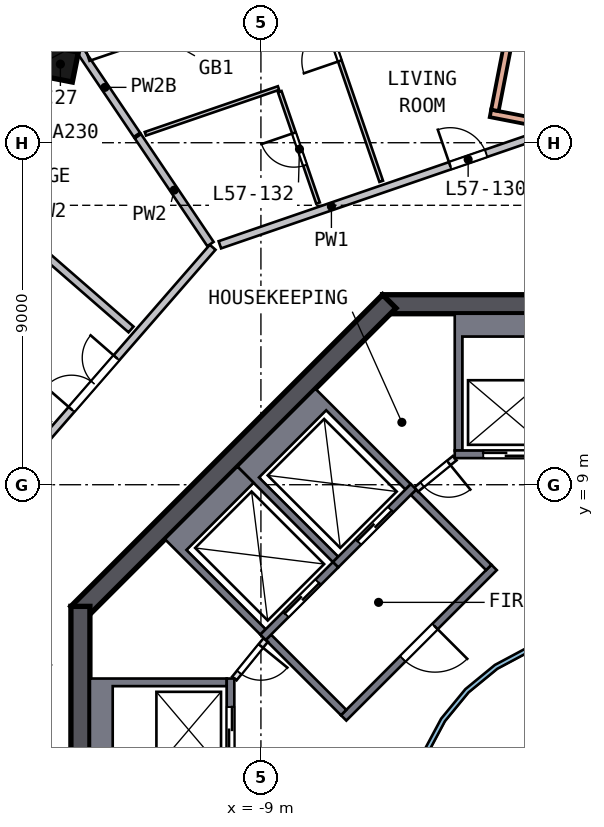
"""IFC4 building model, lengths in metres.
Left out: names, types, materials, properties, quantities, classifications, styles, units other than length and angle.
Written with IfcOpenShell. Run it as: python <this file> out.ifc"""

import sys

from ifc_helpers import new_model, si_unit, direction, frame, frame_2d, origin, origin_2d, place, context, subcontext, project, spatial, polyline, rectangle, outline, extrude, element, fill, save


model = new_model("IFC4")
c1 = context("Model", 3, precision=1e-05, world=origin(), true_north=direction((0.0, 1.0)))
c2 = subcontext(c1, "Body", "Model", "MODEL_VIEW")
j1 = project(units=[si_unit("LENGTHUNIT", "METRE"), si_unit("PLANEANGLEUNIT", "RADIAN")], contexts=[c1])
p1 = place(None, origin())
s1 = spatial("IfcSite", under=j1, at=p1, CompositionType="ELEMENT")
p2 = place(p1, origin())
s2 = spatial("IfcBuilding", under=s1, at=p2, CompositionType="ELEMENT")
p3 = place(p2, frame((0.0, 0.0, 234.0)))
s3 = spatial("IfcBuildingStorey", under=s2, at=p3, CompositionType="ELEMENT", Elevation=234.0)
p4 = place(p3, frame((-14.162, 20.15, 0.0), z_axis=(-0.095237688, -0.068178935, 0.99311702), x_axis=(0.977061019, -0.197299919, 0.080153025)))
e1 = element("IfcColumn", 1, at=p4, inside=s3, PredefinedType="COLUMN", context=c2, shape_type="SweptSolid", body=[
    extrude(rectangle(XDim=0.8, YDim=0.8, at=origin_2d()), origin(), (0.0, 0.0, 1.0), 3.212),
])
p5 = place(p3, frame((5.799, 13.75, 0.0), z_axis=(0.0, 0.0, 1.0), x_axis=(-1.0, 0.0, 0.0)))
e2 = element("IfcWall", 2, at=p5, inside=s3, PredefinedType="SHEAR", context=c2, shape_type="SweptSolid", body=[
    extrude(rectangle(XDim=11.598, YDim=0.5, at=frame_2d((5.799, 0.0))), origin(), (0.0, 0.0, 1.0), 3.5),
])
p6 = place(p5, frame((4.899, 0.0, 0.0)))
e3 = element("IfcOpeningElement", 3, at=p6, cuts=e2, PredefinedType="OPENING", context=c2, shape_type="SweptSolid", body=[
    extrude(rectangle(XDim=1.8, YDim=2.1, at=frame_2d((0.9, 1.05))), frame((0.0, 0.26, 0.0), z_axis=(0.0, -1.0, 0.0), x_axis=(1.0, 0.0, 0.0)), (0.0, 0.0, 1.0), 0.52),
])
p7 = place(p3, frame((-5.622, 13.823, 0.0), z_axis=(0.0, 0.0, 1.0), x_axis=(-0.707106781, -0.707106781, 0.0)))
e4 = element("IfcWall", 4, at=p7, inside=s3, PredefinedType="SHEAR", context=c2, shape_type="SweptSolid", body=[
    extrude(rectangle(XDim=11.598, YDim=0.5, at=frame_2d((5.799, 0.0))), origin(), (0.0, 0.0, 1.0), 3.5),
])
p8 = place(p3, frame((-13.75, 5.799, 0.0), z_axis=(0.0, 0.0, 1.0), x_axis=(0.0, -1.0, 0.0)))
e5 = element("IfcWall", 5, at=p8, inside=s3, PredefinedType="SHEAR", context=c2, shape_type="SweptSolid", body=[
    extrude(rectangle(XDim=11.598, YDim=0.5, at=frame_2d((5.799, 0.0))), origin(), (0.0, 0.0, 1.0), 3.5),
])
p9 = place(p8, frame((4.899, 0.0, 0.0)))
e6 = element("IfcOpeningElement", 6, at=p9, cuts=e5, PredefinedType="OPENING", context=c2, shape_type="SweptSolid", body=[
    extrude(rectangle(XDim=1.8, YDim=2.1, at=frame_2d((0.9, 1.05))), frame((0.0, 0.26, 0.0), z_axis=(0.0, -1.0, 0.0), x_axis=(1.0, 0.0, 0.0)), (0.0, 0.0, 1.0), 0.52),
])
p10 = place(p3, frame((-2.96, 18.772, 0.0), z_axis=(0.0, 0.0, 1.0), x_axis=(0.981496446, -0.191480354, 0.0)))
e7 = element("IfcWall", 7, at=p10, inside=s3, PredefinedType="SOLIDWALL", context=c2, shape_type="SweptSolid", body=[
    extrude(rectangle(XDim=13.0, YDim=0.2, at=frame_2d((6.5, 0.0))), origin(), (0.0, 0.0, 1.0), 3.19),
])
p11 = place(p10, frame((5.6, 0.0, 0.0)))
e8 = element("IfcOpeningElement", 8, at=p11, cuts=e7, PredefinedType="OPENING", context=c2, shape_type="SweptSolid", body=[
    extrude(rectangle(XDim=1.8, YDim=2.4, at=frame_2d((0.9, 1.2))), frame((0.0, 0.11, 0.0), z_axis=(0.0, -1.0, 0.0), x_axis=(1.0, 0.0, 0.0)), (0.0, 0.0, 1.0), 0.22),
])
p12 = place(p3, frame((-1.875, 23.81, 0.0), z_axis=(0.0, 0.0, 1.0), x_axis=(-0.191467212, -0.98149901, 0.0)))
e9 = element("IfcWall", 9, at=p12, inside=s3, PredefinedType="SOLIDWALL", context=c2, shape_type="SweptSolid", body=[
    extrude(rectangle(XDim=5.052, YDim=0.2, at=frame_2d((2.526, 0.0))), origin(), (0.0, 0.0, 1.0), 3.19),
])
p13 = place(p3, origin())
e10 = element("IfcWall", 10, at=p13, inside=s3, PredefinedType="SOLIDWALL", context=c2, shape_type="SweptSolid", body=[
    extrude(outline(polyline([(-3.9, 13.5), (-1.2, 13.5), (-1.2, 9.9), (-1.4, 9.9), (-1.4, 12.9), (-3.7, 12.9), (-3.7, 9.9), (-3.9, 9.9), (-3.9, 13.5)])), origin(), (0.0, 0.0, 1.0), 3.19),
])
p14 = place(p3, frame((-1.2, 9.8, 0.0), z_axis=(0.0, 0.0, 1.0), x_axis=(-1.0, 0.0, 0.0)))
e11 = element("IfcWall", 11, at=p14, inside=s3, PredefinedType="SOLIDWALL", context=c2, shape_type="SweptSolid", body=[
    extrude(rectangle(XDim=2.7, YDim=0.2, at=frame_2d((1.35, 0.0))), origin(), (0.0, 0.0, 1.0), 3.19),
])
p15 = place(p14, frame((0.75, 0.0, 0.0)))
e12 = element("IfcOpeningElement", 12, at=p15, cuts=e11, PredefinedType="OPENING", context=c2, shape_type="SweptSolid", body=[
    extrude(rectangle(XDim=1.2, YDim=2.1, at=frame_2d((0.6, 1.05))), frame((0.0, 0.11, 0.0), z_axis=(0.0, -1.0, 0.0), x_axis=(1.0, 0.0, 0.0)), (0.0, 0.0, 1.0), 0.22),
])
p16 = place(p3, origin())
e13 = element("IfcWall", 13, at=p16, inside=s3, PredefinedType="SOLIDWALL", context=c2, shape_type="SweptSolid", body=[
    extrude(outline(polyline([(-13.5, 3.9), (-9.9, 3.9), (-9.9, 3.7), (-12.9, 3.7), (-12.9, 1.4), (-9.9, 1.4), (-9.9, 1.2), (-13.5, 1.2), (-13.5, 3.9)])), origin(), (0.0, 0.0, 1.0), 3.19),
])
p17 = place(p3, frame((-9.8, 1.2, 0.0), z_axis=(0.0, 0.0, 1.0), x_axis=(0.0, 1.0, 0.0)))
e14 = element("IfcWall", 14, at=p17, inside=s3, PredefinedType="SOLIDWALL", context=c2, shape_type="SweptSolid", body=[
    extrude(rectangle(XDim=2.7, YDim=0.2, at=frame_2d((1.35, 0.0))), origin(), (0.0, 0.0, 1.0), 3.19),
])
p18 = place(p17, frame((0.75, 0.0, 0.0)))
e15 = element("IfcOpeningElement", 15, at=p18, cuts=e14, PredefinedType="OPENING", context=c2, shape_type="SweptSolid", body=[
    extrude(rectangle(XDim=1.2, YDim=2.1, at=frame_2d((0.6, 1.05))), frame((0.0, 0.11, 0.0), z_axis=(0.0, -1.0, 0.0), x_axis=(1.0, 0.0, 0.0)), (0.0, 0.0, 1.0), 0.22),
])
p19 = place(p3, origin())
e16 = element("IfcWall", 16, at=p19, inside=s3, PredefinedType="SOLIDWALL", context=c2, shape_type="SweptSolid", body=[
    extrude(outline(polyline([(-9.617, 9.475), (-7.566, 11.526), (-5.056, 9.016), (-5.197, 8.874), (-7.283, 10.96), (-9.051, 9.192), (-6.965, 7.106), (-7.106, 6.965), (-9.617, 9.475)])), origin(), (0.0, 0.0, 1.0), 3.19),
])
p20 = place(p3, frame((-4.985, 8.945, 0.0), z_axis=(0.0, 0.0, 1.0), x_axis=(-0.707106781, -0.707106781, 0.0)))
e17 = element("IfcWall", 17, at=p20, inside=s3, PredefinedType="SOLIDWALL", context=c2, shape_type="SweptSolid", body=[
    extrude(rectangle(XDim=2.9, YDim=0.2, at=frame_2d((1.45, 0.0))), origin(), (0.0, 0.0, 1.0), 3.19),
])
p21 = place(p20, frame((0.85, 0.0, 0.0)))
e18 = element("IfcOpeningElement", 18, at=p21, cuts=e17, PredefinedType="OPENING", context=c2, shape_type="SweptSolid", body=[
    extrude(rectangle(XDim=1.2, YDim=2.1, at=frame_2d((0.6, 1.05))), frame((0.0, 0.11, 0.0), z_axis=(0.0, -1.0, 0.0), x_axis=(1.0, 0.0, 0.0)), (0.0, 0.0, 1.0), 0.22),
])
p22 = place(p3, origin())
e19 = element("IfcWall", 19, at=p22, inside=s3, PredefinedType="SOLIDWALL", context=c2, shape_type="SweptSolid", body=[
    extrude(outline(polyline([(-11.526, 7.566), (-9.617, 9.475), (-9.192, 9.051), (-10.96, 7.283), (-8.874, 5.197), (-9.016, 5.056), (-11.526, 7.566)])), origin(), (0.0, 0.0, 1.0), 3.19),
])
p23 = place(p3, frame((-7.036, 6.894, 0.0), z_axis=(0.0, 0.0, 1.0), x_axis=(-0.707106781, -0.707106781, 0.0)))
e20 = element("IfcWall", 20, at=p23, inside=s3, PredefinedType="SOLIDWALL", context=c2, shape_type="SweptSolid", body=[
    extrude(rectangle(XDim=2.7, YDim=0.2, at=frame_2d((1.35, 0.0))), origin(), (0.0, 0.0, 1.0), 3.19),
])
p24 = place(p23, frame((0.65, 0.0, 0.0)))
e21 = element("IfcOpeningElement", 21, at=p24, cuts=e20, PredefinedType="OPENING", context=c2, shape_type="SweptSolid", body=[
    extrude(rectangle(XDim=1.2, YDim=2.1, at=frame_2d((0.6, 1.05))), frame((0.0, 0.11, 0.0), z_axis=(0.0, -1.0, 0.0), x_axis=(1.0, 0.0, 0.0)), (0.0, 0.0, 1.0), 0.22),
])
p25 = place(p3, frame((-2.864, 6.823, 0.0), z_axis=(0.0, 0.0, 1.0), x_axis=(-0.707106781, -0.707106781, 0.0)))
e22 = element("IfcWall", 22, at=p25, inside=s3, PredefinedType="SOLIDWALL", context=c2, shape_type="SweptSolid", body=[
    extrude(rectangle(XDim=5.6, YDim=0.2, at=frame_2d((2.8, 0.0))), origin(), (0.0, 0.0, 1.0), 3.19),
])
p26 = place(p25, frame((2.2, 0.0, 0.0)))
e23 = element("IfcOpeningElement", 23, at=p26, cuts=e22, PredefinedType="OPENING", context=c2, shape_type="SweptSolid", body=[
    extrude(rectangle(XDim=1.2, YDim=2.1, at=frame_2d((0.6, 1.05))), frame((0.0, 0.11, 0.0), z_axis=(0.0, -1.0, 0.0), x_axis=(1.0, 0.0, 0.0)), (0.0, 0.0, 1.0), 0.22),
])
for number, where, z_axis, x_axis in (
    (24, (-3.005, 6.823, 0.0), (0.0, 0.0, 1.0), (-0.707, 0.707, 0.0)),
    (25, (-6.823, 3.005, 0.0), (0.0, 0.0, 1.0), (-0.707, 0.707, 0.0)),
):
    element("IfcWall", number, at=place(p3, frame(where, z_axis=z_axis, x_axis=x_axis)), inside=s3, PredefinedType="SOLIDWALL", context=c2, shape_type="SweptSolid", body=[
        extrude(rectangle(XDim=2.8, YDim=0.2, at=frame_2d((1.4, 0.0))), origin(), (0.0, 0.0, 1.0), 3.19),
    ])
p27 = place(p3, frame((-3.9, 9.7, 0.0), z_axis=(0.0, 0.0, 1.0), x_axis=(-0.775559878, -0.631274009, 0.0)))
e26 = element("IfcWall", 26, at=p27, inside=s3, PredefinedType="PARTITIONING", context=c2, shape_type="SweptSolid", body=[
    extrude(rectangle(XDim=1.308, YDim=0.15, at=frame_2d((0.654, 0.0))), origin(), (0.0, 0.0, 1.0), 3.19),
])
p28 = place(p27, frame((0.204, 0.0, 0.0)))
e27 = element("IfcOpeningElement", 27, at=p28, cuts=e26, PredefinedType="OPENING", context=c2, shape_type="SweptSolid", body=[
    extrude(rectangle(XDim=0.9, YDim=2.1, at=frame_2d((0.45, 1.05))), frame((0.0, 0.085, 0.0), z_axis=(0.0, -1.0, 0.0), x_axis=(1.0, 0.0, 0.0)), (0.0, 0.0, 1.0), 0.17),
])
p29 = place(p3, frame((-8.874, 4.914, 0.0), z_axis=(0.0, 0.0, 1.0), x_axis=(-0.631274009, -0.775559878, 0.0)))
e28 = element("IfcWall", 28, at=p29, inside=s3, PredefinedType="PARTITIONING", context=c2, shape_type="SweptSolid", body=[
    extrude(rectangle(XDim=1.308, YDim=0.15, at=frame_2d((0.654, 0.0))), origin(), (0.0, 0.0, 1.0), 3.19),
])
p30 = place(p29, frame((0.204, 0.0, 0.0)))
e29 = element("IfcOpeningElement", 29, at=p30, cuts=e28, PredefinedType="OPENING", context=c2, shape_type="SweptSolid", body=[
    extrude(rectangle(XDim=0.9, YDim=2.1, at=frame_2d((0.45, 1.05))), frame((0.0, 0.085, 0.0), z_axis=(0.0, -1.0, 0.0), x_axis=(1.0, 0.0, 0.0)), (0.0, 0.0, 1.0), 0.17),
])
p31 = place(p3, origin())
e30 = element("IfcWall", 30, at=p31, inside=s3, PredefinedType="SOLIDWALL", context=c2, shape_type="SweptSolid", body=[
    extrude(outline(polyline([(5.021, -0.999), (4.73, -1.959), (4.257, -2.844), (3.62, -3.62), (2.844, -4.257), (1.959, -4.73), (0.999, -5.021), (0.0, -5.12), (-0.999, -5.021), (-1.959, -4.73), (-2.844, -4.257), (-3.62, -3.62), (-4.257, -2.844), (-4.73, -1.959), (-5.021, -0.999), (-5.12, 0.0), (-5.021, 0.999), (-4.73, 1.959), (-4.257, 2.844), (-3.62, 3.62), (-2.844, 4.257), (-1.959, 4.73), (-0.999, 5.021), (0.0, 5.12), (0.999, 5.021), (1.959, 4.73), (2.844, 4.257), (3.62, 3.62), (4.257, 2.844), (4.73, 1.959), (5.021, 0.999), (5.12, 0.0), (5.021, -0.999)]), holes=[polyline([(4.904, 0.976), (4.619, 1.913), (4.157, 2.778), (3.535, 3.535), (2.778, 4.157), (1.913, 4.619), (0.976, 4.904), (0.0, 5.0), (-0.976, 4.904), (-1.913, 4.619), (-2.778, 4.157), (-3.535, 3.535), (-4.157, 2.778), (-4.619, 1.913), (-4.904, 0.976), (-5.0, 0.0), (-4.904, -0.976), (-4.619, -1.913), (-4.157, -2.778), (-3.535, -3.535), (-2.778, -4.157), (-1.913, -4.619), (-0.976, -4.904), (0.0, -5.0), (0.976, -4.904), (1.913, -4.619), (2.778, -4.157), (3.535, -3.535), (4.157, -2.778), (4.619, -1.913), (4.904, -0.976), (5.0, 0.0), (4.904, 0.976)])]), origin(), (0.0, 0.0, 1.0), 3.19),
])
p32 = place(p3, frame((-16.519, 8.071, 0.0), z_axis=(0.0, 0.0, 1.0), x_axis=(0.656586376, 0.754250841, 0.0)))
e31 = element("IfcWall", 31, at=p32, inside=s3, PredefinedType="SOLIDWALL", context=c2, shape_type="SweptSolid", body=[
    extrude(rectangle(XDim=9.517, YDim=0.2, at=frame_2d((4.758, 0.0))), origin(), (0.0, 0.0, 1.0), 3.19),
])
p33 = place(p32, frame((3.861, 0.0, 0.0)))
e32 = element("IfcOpeningElement", 32, at=p33, cuts=e31, PredefinedType="OPENING", context=c2, shape_type="SweptSolid", body=[
    extrude(rectangle(XDim=1.8, YDim=2.1, at=frame_2d((0.9, 1.05))), frame((0.0, 0.11, 0.0), z_axis=(0.0, -1.0, 0.0), x_axis=(1.0, 0.0, 0.0)), (0.0, 0.0, 1.0), 0.22),
])
p34 = place(p3, frame((-10.081, 15.314, 0.0), z_axis=(0.0, 0.0, 1.0), x_axis=(0.945740847, 0.324921914, 0.0)))
e33 = element("IfcWall", 33, at=p34, inside=s3, PredefinedType="SOLIDWALL", context=c2, shape_type="SweptSolid", body=[
    extrude(rectangle(XDim=9.337, YDim=0.2, at=frame_2d((4.668, 0.0))), origin(), (0.0, 0.0, 1.0), 3.19),
])
p35 = place(p34, frame((6.408, 0.0, 0.0)))
e34 = element("IfcOpeningElement", 34, at=p35, cuts=e33, PredefinedType="OPENING", context=c2, shape_type="SweptSolid", body=[
    extrude(rectangle(XDim=1.0, YDim=2.1, at=frame_2d((0.5, 1.05))), frame((0.0, 0.11, 0.0), z_axis=(0.0, -1.0, 0.0), x_axis=(1.0, 0.0, 0.0)), (0.0, 0.0, 1.0), 0.22),
])
p36 = place(p3, frame((-21.889, 21.331, 0.0), z_axis=(0.0, 0.0, 1.0), x_axis=(0.754259249, -0.656576717, 0.0)))
e35 = element("IfcWall", 35, at=p36, inside=s3, PredefinedType="SOLIDWALL", context=c2, shape_type="SweptSolid", body=[
    extrude(rectangle(XDim=12.557, YDim=0.2, at=frame_2d((6.278, 0.0))), origin(), (0.0, 0.0, 1.0), 3.19),
])
p37 = place(p36, frame((3.9, 0.0, 0.0)))
e36 = element("IfcOpeningElement", 36, at=p37, cuts=e35, PredefinedType="OPENING", context=c2, shape_type="SweptSolid", body=[
    extrude(rectangle(XDim=1.0, YDim=2.1, at=frame_2d((0.5, 1.05))), frame((0.0, 0.11, 0.0), z_axis=(0.0, -1.0, 0.0), x_axis=(1.0, 0.0, 0.0)), (0.0, 0.0, 1.0), 0.22),
])
p38 = place(p3, frame((-13.945, 20.706, 0.0), z_axis=(0.0, 0.0, 1.0), x_axis=(0.558585582, -0.829446893, 0.0)))
e37 = element("IfcWall", 37, at=p38, inside=s3, PredefinedType="SOLIDWALL", context=c2, shape_type="SweptSolid", body=[
    extrude(rectangle(XDim=3.011, YDim=0.2, at=frame_2d((1.506, 0.0))), origin(), (0.0, 0.0, 1.0), 2.69),
])
p39 = place(p3, frame((-12.237, 18.17, 0.0), z_axis=(0.0, 0.0, 1.0), x_axis=(0.558600379, -0.829436927, 0.0)))
e38 = element("IfcWall", 38, at=p39, inside=s3, PredefinedType="SOLIDWALL", context=c2, shape_type="SweptSolid", body=[
    extrude(rectangle(XDim=3.418, YDim=0.2, at=frame_2d((1.709, 0.0))), origin(), (0.0, 0.0, 1.0), 3.19),
])
p40 = place(p3, frame((-8.537, 19.439, 0.0), z_axis=(0.0, 0.0, 1.0), x_axis=(-0.94573661, -0.324934246, 0.0)))
e39 = element("IfcWall", 39, at=p40, inside=s3, PredefinedType="PARTITIONING", context=c2, shape_type="SweptSolid", body=[
    extrude(rectangle(XDim=3.704, YDim=0.1, at=frame_2d((1.852, 0.0))), origin(), (0.0, 0.0, 1.0), 3.19),
])
p41 = place(p3, frame((-7.498, 16.413, 0.0), z_axis=(0.0, 0.0, 1.0), x_axis=(-0.324861861, 0.945761477, 0.0)))
e40 = element("IfcWall", 40, at=p41, inside=s3, PredefinedType="PARTITIONING", context=c2, shape_type="SweptSolid", body=[
    extrude(rectangle(XDim=3.1, YDim=0.1, at=frame_2d((1.55, 0.0))), origin(), (0.0, 0.0, 1.0), 3.19),
])
p42 = place(p41, frame((1.05, 0.0, 0.0)))
e41 = element("IfcOpeningElement", 41, at=p42, cuts=e40, PredefinedType="OPENING", context=c2, shape_type="SweptSolid", body=[
    extrude(rectangle(XDim=0.9, YDim=2.1, at=frame_2d((0.45, 1.05))), frame((0.0, 0.06, 0.0), z_axis=(0.0, -1.0, 0.0), x_axis=(1.0, 0.0, 0.0)), (0.0, 0.0, 1.0), 0.12),
])
p43 = place(p3, frame((-5.835, 16.984, 0.0), z_axis=(0.0, 0.0, 1.0), x_axis=(-0.324920005, 0.945741503, 0.0)))
e42 = element("IfcWall", 42, at=p43, inside=s3, PredefinedType="PARTITIONING", context=c2, shape_type="SweptSolid", body=[
    extrude(rectangle(XDim=6.15, YDim=0.1, at=frame_2d((3.075, 0.0))), origin(), (0.0, 0.0, 1.0), 3.19),
])
p44 = place(p43, frame((3.35, 0.0, 0.0)))
e43 = element("IfcOpeningElement", 43, at=p44, cuts=e42, PredefinedType="OPENING", context=c2, shape_type="SweptSolid", body=[
    extrude(rectangle(XDim=1.0, YDim=2.1, at=frame_2d((0.5, 1.05))), frame((0.0, 0.06, 0.0), z_axis=(0.0, -1.0, 0.0), x_axis=(1.0, 0.0, 0.0)), (0.0, 0.0, 1.0), 0.12),
])
p45 = place(p15, origin())
e44 = element("IfcDoor", 44, at=p45, inside=s3, OperationType="DOUBLE_DOOR_SLIDING", PredefinedType="DOOR", context=c2, shape_type="SweptSolid", body=[
    extrude(rectangle(XDim=1.2, YDim=2.1, at=frame_2d((0.6, 1.05))), frame((0.0, 0.025, 0.0), z_axis=(0.0, -1.0, 0.0), x_axis=(1.0, 0.0, 0.0)), (0.0, 0.0, 1.0), 0.05),
])
fill(e12, e44)
p46 = place(p18, origin())
e45 = element("IfcDoor", 45, at=p46, inside=s3, OperationType="DOUBLE_DOOR_SLIDING", PredefinedType="DOOR", context=c2, shape_type="SweptSolid", body=[
    extrude(rectangle(XDim=1.2, YDim=2.1, at=frame_2d((0.6, 1.05))), frame((0.0, 0.025, 0.0), z_axis=(0.0, -1.0, 0.0), x_axis=(1.0, 0.0, 0.0)), (0.0, 0.0, 1.0), 0.05),
])
fill(e15, e45)
p47 = place(p21, origin())
e46 = element("IfcDoor", 46, at=p47, inside=s3, OperationType="DOUBLE_DOOR_SLIDING", PredefinedType="DOOR", context=c2, shape_type="SweptSolid", body=[
    extrude(rectangle(XDim=1.2, YDim=2.1, at=frame_2d((0.6, 1.05))), frame((0.0, 0.025, 0.0), z_axis=(0.0, -1.0, 0.0), x_axis=(1.0, 0.0, 0.0)), (0.0, 0.0, 1.0), 0.05),
])
fill(e18, e46)
p48 = place(p24, origin())
e47 = element("IfcDoor", 47, at=p48, inside=s3, OperationType="DOUBLE_DOOR_SLIDING", PredefinedType="DOOR", context=c2, shape_type="SweptSolid", body=[
    extrude(rectangle(XDim=1.2, YDim=2.1, at=frame_2d((0.6, 1.05))), frame((0.0, 0.025, 0.0), z_axis=(0.0, -1.0, 0.0), x_axis=(1.0, 0.0, 0.0)), (0.0, 0.0, 1.0), 0.05),
])
fill(e21, e47)
p49 = place(p26, origin())
e48 = element("IfcDoor", 48, at=p49, inside=s3, OperationType="SINGLE_SWING_LEFT", PredefinedType="DOOR", context=c2, shape_type="SweptSolid", body=[
    extrude(rectangle(XDim=1.2, YDim=2.1, at=frame_2d((0.6, 1.05))), frame((0.0, 0.025, 0.0), z_axis=(0.0, -1.0, 0.0), x_axis=(1.0, 0.0, 0.0)), (0.0, 0.0, 1.0), 0.05),
])
fill(e23, e48)
p50 = place(p28, origin())
e49 = element("IfcDoor", 49, at=p50, inside=s3, OperationType="SINGLE_SWING_LEFT", PredefinedType="DOOR", context=c2, shape_type="SweptSolid", body=[
    extrude(rectangle(XDim=0.9, YDim=2.1, at=frame_2d((0.45, 1.05))), frame((0.0, 0.025, 0.0), z_axis=(0.0, -1.0, 0.0), x_axis=(1.0, 0.0, 0.0)), (0.0, 0.0, 1.0), 0.05),
])
fill(e27, e49)
p51 = place(p30, origin())
e50 = element("IfcDoor", 50, at=p51, inside=s3, OperationType="SINGLE_SWING_LEFT", PredefinedType="DOOR", context=c2, shape_type="SweptSolid", body=[
    extrude(rectangle(XDim=0.9, YDim=2.1, at=frame_2d((0.45, 1.05))), frame((0.0, 0.025, 0.0), z_axis=(0.0, -1.0, 0.0), x_axis=(1.0, 0.0, 0.0)), (0.0, 0.0, 1.0), 0.05),
])
fill(e29, e50)
p52 = place(p33, origin())
e51 = element("IfcDoor", 51, at=p52, inside=s3, OperationType="DOUBLE_DOOR_SINGLE_SWING", PredefinedType="DOOR", context=c2, shape_type="SweptSolid", body=[
    extrude(rectangle(XDim=1.8, YDim=2.1, at=frame_2d((0.9, 1.05))), frame((0.0, 0.025, 0.0), z_axis=(0.0, -1.0, 0.0), x_axis=(1.0, 0.0, 0.0)), (0.0, 0.0, 1.0), 0.05),
])
fill(e32, e51)
p53 = place(p35, origin())
e52 = element("IfcDoor", 52, at=p53, inside=s3, OperationType="SINGLE_SWING_LEFT", PredefinedType="DOOR", context=c2, shape_type="SweptSolid", body=[
    extrude(rectangle(XDim=1.0, YDim=2.1, at=frame_2d((0.5, 1.05))), frame((0.0, 0.025, 0.0), z_axis=(0.0, -1.0, 0.0), x_axis=(1.0, 0.0, 0.0)), (0.0, 0.0, 1.0), 0.05),
])
fill(e34, e52)
p54 = place(p44, origin())
e53 = element("IfcDoor", 53, at=p54, inside=s3, OperationType="SINGLE_SWING_LEFT", PredefinedType="DOOR", context=c2, shape_type="SweptSolid", body=[
    extrude(rectangle(XDim=1.0, YDim=2.1, at=frame_2d((0.5, 1.05))), frame((0.0, 0.025, 0.0), z_axis=(0.0, -1.0, 0.0), x_axis=(1.0, 0.0, 0.0)), (0.0, 0.0, 1.0), 0.05),
])
fill(e43, e53)
p55 = place(p42, origin())
e54 = element("IfcDoor", 54, at=p55, inside=s3, OperationType="SINGLE_SWING_RIGHT", PredefinedType="DOOR", context=c2, shape_type="SweptSolid", body=[
    extrude(rectangle(XDim=0.9, YDim=2.1, at=frame_2d((0.45, 1.05))), frame((0.0, 0.025, 0.0), z_axis=(0.0, -1.0, 0.0), x_axis=(1.0, 0.0, 0.0)), (0.0, 0.0, 1.0), 0.05),
])
fill(e41, e54)
save(model, sys.argv[1])
